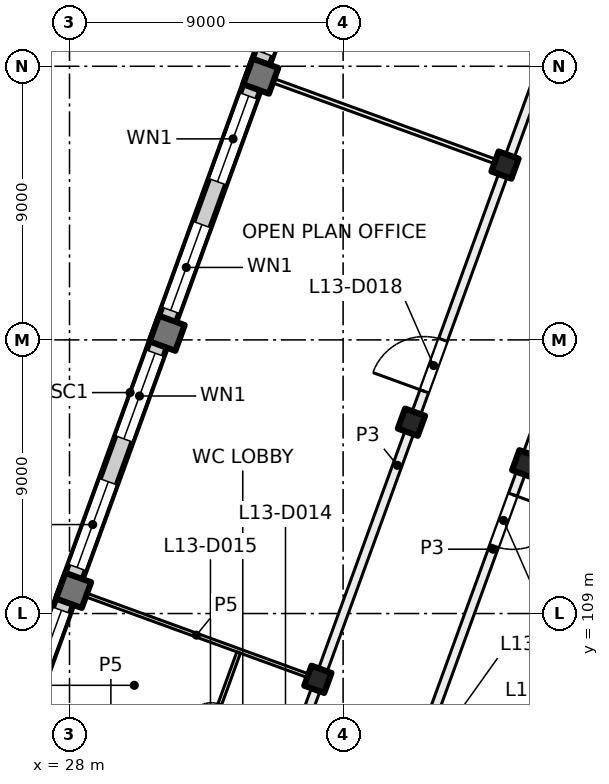
"""IFC4 building model, lengths in metres.
Left out: names, types, materials, properties, quantities, classifications, styles, units other than length and angle.
Written with IfcOpenShell. Run it as: python <this file> out.ifc"""

import sys

from ifc_helpers import new_model, si_unit, direction, frame, frame_2d, origin, origin_2d, place, context, subcontext, project, spatial, rectangle, extrude, element, fill, save


model = new_model("IFC4")
c1 = context("Model", 3, precision=1e-05, world=origin(), true_north=direction((0.0, 1.0)))
c2 = subcontext(c1, "Body", "Model", "MODEL_VIEW")
j1 = project(units=[si_unit("LENGTHUNIT", "METRE"), si_unit("PLANEANGLEUNIT", "RADIAN")], contexts=[c1])
p1 = place(None, origin())
s1 = spatial("IfcSite", under=j1, at=p1, CompositionType="ELEMENT")
p2 = place(p1, origin())
s2 = spatial("IfcBuilding", under=s1, at=p2, CompositionType="ELEMENT")
p3 = place(p2, frame((0.0, 0.0, 59.5)))
s3 = spatial("IfcBuildingStorey", under=s2, at=p3, CompositionType="ELEMENT", Elevation=59.5)
for number, where, z_axis, x_axis in (
    (1, (43.006, 113.925, 0.0), (0.0, 0.0, 1.0), (-0.342, -0.94, 0.0)),
    (2, (42.325, 123.751, 0.0), (0.0, 0.0, 1.0), (-0.342, -0.94, 0.0)),
    (3, (39.247, 115.293, 0.0), (0.0, 0.0, 1.0), (-0.342, -0.94, 0.0)),
    (4, (36.169, 106.836, 0.0), (0.0, 0.0, 1.0), (-0.342, -0.94, 0.0)),
):
    element("IfcColumn", number, at=place(p3, frame(where, z_axis=z_axis, x_axis=x_axis)), inside=s3, PredefinedType="COLUMN", context=c2, shape_type="SweptSolid", body=[
        extrude(rectangle(XDim=0.7, YDim=0.7, at=origin_2d()), origin(), (0.0, 0.0, 1.0), 4.0),
    ])
for number, where, z_axis, x_axis in (
    (5, (34.291, 126.675, 0.0), (0.0, 0.0, 1.0), (-0.342, -0.94, 0.0)),
    (6, (31.212, 118.218, 0.0), (0.0, 0.0, 1.0), (-0.342, -0.94, 0.0)),
    (7, (28.134, 109.76, 0.0), (0.0, 0.0, 1.0), (-0.342, -0.94, 0.0)),
):
    element("IfcColumn", number, at=place(p3, frame(where, z_axis=z_axis, x_axis=x_axis)), inside=s3, PredefinedType="COLUMN", context=c2, shape_type="SweptSolid", body=[
        extrude(rectangle(XDim=0.9, YDim=0.9, at=origin_2d()), origin(), (0.0, 0.0, 1.0), 4.0),
    ])
p4 = place(p3, frame((24.666, 100.669, 0.0), z_axis=(0.0, 0.0, 1.0), x_axis=(0.34201964167, 0.939692803373, 0.0)))
e8 = element("IfcWall", 8, at=p4, inside=s3, PredefinedType="SOLIDWALL", context=c2, shape_type="SweptSolid", body=[
    extrude(rectangle(XDim=32.884, YDim=0.6, at=frame_2d((16.442, 0.0))), origin(), (0.0, 0.0, 1.0), 3.625),
])
p5 = place(p4, frame((1.48, 0.0, 0.9)))
e9 = element("IfcOpeningElement", 9, at=p5, cuts=e8, PredefinedType="OPENING", context=c2, shape_type="SweptSolid", body=[
    extrude(rectangle(XDim=3.0, YDim=2.4, at=frame_2d((1.5, 1.2))), frame((0.0, 0.31, 0.0), z_axis=(0.0, -1.0, 0.0), x_axis=(1.0, 0.0, 0.0)), (0.0, 0.0, 1.0), 0.62),
])
p6 = place(p4, frame((5.98, 0.0, 0.9)))
e10 = element("IfcOpeningElement", 10, at=p6, cuts=e8, PredefinedType="OPENING", context=c2, shape_type="SweptSolid", body=[
    extrude(rectangle(XDim=3.0, YDim=2.4, at=frame_2d((1.5, 1.2))), frame((0.0, 0.31, 0.0), z_axis=(0.0, -1.0, 0.0), x_axis=(1.0, 0.0, 0.0)), (0.0, 0.0, 1.0), 0.62),
])
p7 = place(p4, frame((10.48, 0.0, 0.9)))
e11 = element("IfcOpeningElement", 11, at=p7, cuts=e8, PredefinedType="OPENING", context=c2, shape_type="SweptSolid", body=[
    extrude(rectangle(XDim=3.0, YDim=2.4, at=frame_2d((1.5, 1.2))), frame((0.0, 0.31, 0.0), z_axis=(0.0, -1.0, 0.0), x_axis=(1.0, 0.0, 0.0)), (0.0, 0.0, 1.0), 0.62),
])
p8 = place(p4, frame((14.98, 0.0, 0.9)))
e12 = element("IfcOpeningElement", 12, at=p8, cuts=e8, PredefinedType="OPENING", context=c2, shape_type="SweptSolid", body=[
    extrude(rectangle(XDim=3.0, YDim=2.4, at=frame_2d((1.5, 1.2))), frame((0.0, 0.31, 0.0), z_axis=(0.0, -1.0, 0.0), x_axis=(1.0, 0.0, 0.0)), (0.0, 0.0, 1.0), 0.62),
])
p9 = place(p4, frame((19.48, 0.0, 0.9)))
e13 = element("IfcOpeningElement", 13, at=p9, cuts=e8, PredefinedType="OPENING", context=c2, shape_type="SweptSolid", body=[
    extrude(rectangle(XDim=3.0, YDim=2.4, at=frame_2d((1.5, 1.2))), frame((0.0, 0.31, 0.0), z_axis=(0.0, -1.0, 0.0), x_axis=(1.0, 0.0, 0.0)), (0.0, 0.0, 1.0), 0.62),
])
p10 = place(p4, frame((23.98, 0.0, 0.9)))
e14 = element("IfcOpeningElement", 14, at=p10, cuts=e8, PredefinedType="OPENING", context=c2, shape_type="SweptSolid", body=[
    extrude(rectangle(XDim=3.0, YDim=2.4, at=frame_2d((1.5, 1.2))), frame((0.0, 0.31, 0.0), z_axis=(0.0, -1.0, 0.0), x_axis=(1.0, 0.0, 0.0)), (0.0, 0.0, 1.0), 0.62),
])
p11 = place(p4, frame((28.48, 0.0, 0.9)))
e15 = element("IfcOpeningElement", 15, at=p11, cuts=e8, PredefinedType="OPENING", context=c2, shape_type="SweptSolid", body=[
    extrude(rectangle(XDim=3.0, YDim=2.4, at=frame_2d((1.5, 1.2))), frame((0.0, 0.31, 0.0), z_axis=(0.0, -1.0, 0.0), x_axis=(1.0, 0.0, 0.0)), (0.0, 0.0, 1.0), 0.62),
])
p12 = place(p3, frame((28.275, 109.709, 0.0), z_axis=(0.0, 0.0, 1.0), x_axis=(0.939697205528, -0.342007546586, 0.0)))
e16 = element("IfcWall", 16, at=p12, inside=s3, PredefinedType="PARTITIONING", context=c2, shape_type="SweptSolid", body=[
    extrude(rectangle(XDim=8.301, YDim=0.125, at=frame_2d((4.15, 0.0))), origin(), (0.0, 0.0, 1.0), 3.625),
])
p13 = place(p3, frame((30.25, 98.615, 0.0), z_axis=(0.0, 0.0, 1.0), x_axis=(0.341998018937, 0.93970067311, 0.0)))
e17 = element("IfcWall", 17, at=p13, inside=s3, PredefinedType="PARTITIONING", context=c2, shape_type="SweptSolid", body=[
    extrude(rectangle(XDim=9.687, YDim=0.125, at=frame_2d((4.844, 0.0))), origin(), (0.0, 0.0, 1.0), 3.625),
])
p14 = place(p13, frame((7.078, 0.0, 0.0)))
e18 = element("IfcOpeningElement", 18, at=p14, cuts=e17, PredefinedType="OPENING", context=c2, shape_type="SweptSolid", body=[
    extrude(rectangle(XDim=0.8, YDim=2.1, at=frame_2d((0.4, 1.05))), frame((0.0, 0.073, 0.0), z_axis=(0.0, -1.0, 0.0), x_axis=(1.0, 0.0, 0.0)), (0.0, 0.0, 1.0), 0.145),
])
p15 = place(p13, frame((3.848, 0.0, 0.0)))
e19 = element("IfcOpeningElement", 19, at=p15, cuts=e17, PredefinedType="OPENING", context=c2, shape_type="SweptSolid", body=[
    extrude(rectangle(XDim=0.8, YDim=2.1, at=frame_2d((0.4, 1.05))), frame((0.0, 0.073, 0.0), z_axis=(0.0, -1.0, 0.0), x_axis=(1.0, 0.0, 0.0)), (0.0, 0.0, 1.0), 0.145),
])
p16 = place(p3, frame((32.881, 97.657, 0.0), z_axis=(0.0, 0.0, 1.0), x_axis=(0.342017360004, 0.939693633828, 0.0)))
e20 = element("IfcWall", 20, at=p16, inside=s3, PredefinedType="PARTITIONING", context=c2, shape_type="SweptSolid", body=[
    extrude(rectangle(XDim=34.516, YDim=0.3, at=frame_2d((17.258, 0.0))), origin(), (0.0, 0.0, 1.0), 3.625),
])
p17 = place(p16, frame((6.0, 0.0, 0.0)))
e21 = element("IfcOpeningElement", 21, at=p17, cuts=e20, PredefinedType="OPENING", context=c2, shape_type="SweptSolid", body=[
    extrude(rectangle(XDim=1.0, YDim=2.1, at=frame_2d((0.5, 1.05))), frame((0.0, 0.16, 0.0), z_axis=(0.0, -1.0, 0.0), x_axis=(1.0, 0.0, 0.0)), (0.0, 0.0, 1.0), 0.32),
])
p18 = place(p16, frame((19.85, 0.0, 0.0)))
e22 = element("IfcOpeningElement", 22, at=p18, cuts=e20, PredefinedType="OPENING", context=c2, shape_type="SweptSolid", body=[
    extrude(rectangle(XDim=1.8, YDim=2.1, at=frame_2d((0.9, 1.05))), frame((0.0, 0.16, 0.0), z_axis=(0.0, -1.0, 0.0), x_axis=(1.0, 0.0, 0.0)), (0.0, 0.0, 1.0), 0.32),
])
p19 = place(p3, frame((42.231, 123.785, 0.0), z_axis=(0.0, 0.0, 1.0), x_axis=(-0.939687752599, 0.342033518263, 0.0)))
e23 = element("IfcWall", 23, at=p19, inside=s3, PredefinedType="PARTITIONING", context=c2, shape_type="SweptSolid", body=[
    extrude(rectangle(XDim=8.301, YDim=0.15, at=frame_2d((4.15, 0.0))), origin(), (0.0, 0.0, 1.0), 3.625),
])
p20 = place(p3, frame((47.314, 125.909, 0.0), z_axis=(0.0, 0.0, 1.0), x_axis=(-0.342010770371, -0.939696032209, 0.0)))
e24 = element("IfcWall", 24, at=p20, inside=s3, PredefinedType="PARTITIONING", context=c2, shape_type="SweptSolid", body=[
    extrude(rectangle(XDim=31.485, YDim=0.3, at=frame_2d((15.742, 0.0))), origin(), (0.0, 0.0, 1.0), 3.625),
])
p21 = place(p20, frame((28.359, 0.0, 0.0)))
e25 = element("IfcOpeningElement", 25, at=p21, cuts=e24, PredefinedType="OPENING", context=c2, shape_type="SweptSolid", body=[
    extrude(rectangle(XDim=1.0, YDim=2.1, at=frame_2d((0.5, 1.05))), frame((0.0, 0.16, 0.0), z_axis=(0.0, -1.0, 0.0), x_axis=(1.0, 0.0, 0.0)), (0.0, 0.0, 1.0), 0.32),
])
p22 = place(p20, frame((23.484, 0.0, 0.0)))
e26 = element("IfcOpeningElement", 26, at=p22, cuts=e24, PredefinedType="OPENING", context=c2, shape_type="SweptSolid", body=[
    extrude(rectangle(XDim=1.0, YDim=2.1, at=frame_2d((0.5, 1.05))), frame((0.0, 0.16, 0.0), z_axis=(0.0, -1.0, 0.0), x_axis=(1.0, 0.0, 0.0)), (0.0, 0.0, 1.0), 0.32),
])
p23 = place(p20, frame((13.834, 0.0, 0.0)))
e27 = element("IfcOpeningElement", 27, at=p23, cuts=e24, PredefinedType="OPENING", context=c2, shape_type="SweptSolid", body=[
    extrude(rectangle(XDim=1.8, YDim=2.1, at=frame_2d((0.9, 1.05))), frame((0.0, 0.16, 0.0), z_axis=(0.0, -1.0, 0.0), x_axis=(1.0, 0.0, 0.0)), (0.0, 0.0, 1.0), 0.32),
])
p24 = place(p6, origin())
e28 = element("IfcWindow", 28, at=p24, inside=s3, PartitioningType="SINGLE_PANEL", PredefinedType="WINDOW", context=c2, shape_type="SweptSolid", body=[
    extrude(rectangle(XDim=3.0, YDim=2.4, at=frame_2d((1.5, 1.2))), frame((0.0, 0.03, 0.0), z_axis=(0.0, -1.0, 0.0), x_axis=(1.0, 0.0, 0.0)), (0.0, 0.0, 1.0), 0.06),
])
fill(e10, e28)
p25 = place(p7, origin())
e29 = element("IfcWindow", 29, at=p25, inside=s3, PartitioningType="SINGLE_PANEL", PredefinedType="WINDOW", context=c2, shape_type="SweptSolid", body=[
    extrude(rectangle(XDim=3.0, YDim=2.4, at=frame_2d((1.5, 1.2))), frame((0.0, 0.03, 0.0), z_axis=(0.0, -1.0, 0.0), x_axis=(1.0, 0.0, 0.0)), (0.0, 0.0, 1.0), 0.06),
])
fill(e11, e29)
p26 = place(p8, origin())
e30 = element("IfcWindow", 30, at=p26, inside=s3, PartitioningType="SINGLE_PANEL", PredefinedType="WINDOW", context=c2, shape_type="SweptSolid", body=[
    extrude(rectangle(XDim=3.0, YDim=2.4, at=frame_2d((1.5, 1.2))), frame((0.0, 0.03, 0.0), z_axis=(0.0, -1.0, 0.0), x_axis=(1.0, 0.0, 0.0)), (0.0, 0.0, 1.0), 0.06),
])
fill(e12, e30)
p27 = place(p9, origin())
e31 = element("IfcWindow", 31, at=p27, inside=s3, PartitioningType="SINGLE_PANEL", PredefinedType="WINDOW", context=c2, shape_type="SweptSolid", body=[
    extrude(rectangle(XDim=3.0, YDim=2.4, at=frame_2d((1.5, 1.2))), frame((0.0, 0.03, 0.0), z_axis=(0.0, -1.0, 0.0), x_axis=(1.0, 0.0, 0.0)), (0.0, 0.0, 1.0), 0.06),
])
fill(e13, e31)
p28 = place(p10, origin())
e32 = element("IfcWindow", 32, at=p28, inside=s3, PartitioningType="SINGLE_PANEL", PredefinedType="WINDOW", context=c2, shape_type="SweptSolid", body=[
    extrude(rectangle(XDim=3.0, YDim=2.4, at=frame_2d((1.5, 1.2))), frame((0.0, 0.03, 0.0), z_axis=(0.0, -1.0, 0.0), x_axis=(1.0, 0.0, 0.0)), (0.0, 0.0, 1.0), 0.06),
])
fill(e14, e32)
p29 = place(p11, origin())
e33 = element("IfcWindow", 33, at=p29, inside=s3, PartitioningType="SINGLE_PANEL", PredefinedType="WINDOW", context=c2, shape_type="SweptSolid", body=[
    extrude(rectangle(XDim=3.0, YDim=2.4, at=frame_2d((1.5, 1.2))), frame((0.0, 0.03, 0.0), z_axis=(0.0, -1.0, 0.0), x_axis=(1.0, 0.0, 0.0)), (0.0, 0.0, 1.0), 0.06),
])
fill(e15, e33)
p30 = place(p14, origin())
e34 = element("IfcDoor", 34, at=p30, inside=s3, OperationType="SINGLE_SWING_RIGHT", PredefinedType="DOOR", context=c2, shape_type="SweptSolid", body=[
    extrude(rectangle(XDim=0.8, YDim=2.1, at=frame_2d((0.4, 1.05))), frame((0.0, 0.025, 0.0), z_axis=(0.0, -1.0, 0.0), x_axis=(1.0, 0.0, 0.0)), (0.0, 0.0, 1.0), 0.05),
])
fill(e18, e34)
p31 = place(p18, origin())
e35 = element("IfcDoor", 35, at=p31, inside=s3, OperationType="DOUBLE_DOOR_SINGLE_SWING", PredefinedType="DOOR", context=c2, shape_type="SweptSolid", body=[
    extrude(rectangle(XDim=1.8, YDim=2.1, at=frame_2d((0.9, 1.05))), frame((0.0, 0.025, 0.0), z_axis=(0.0, -1.0, 0.0), x_axis=(1.0, 0.0, 0.0)), (0.0, 0.0, 1.0), 0.05),
])
fill(e22, e35)
p32 = place(p23, origin())
e36 = element("IfcDoor", 36, at=p32, inside=s3, OperationType="DOUBLE_DOOR_SINGLE_SWING", PredefinedType="DOOR", context=c2, shape_type="SweptSolid", body=[
    extrude(rectangle(XDim=1.8, YDim=2.1, at=frame_2d((0.9, 1.05))), frame((0.0, 0.025, 0.0), z_axis=(0.0, -1.0, 0.0), x_axis=(1.0, 0.0, 0.0)), (0.0, 0.0, 1.0), 0.05),
])
fill(e27, e36)
save(model, sys.argv[1])
